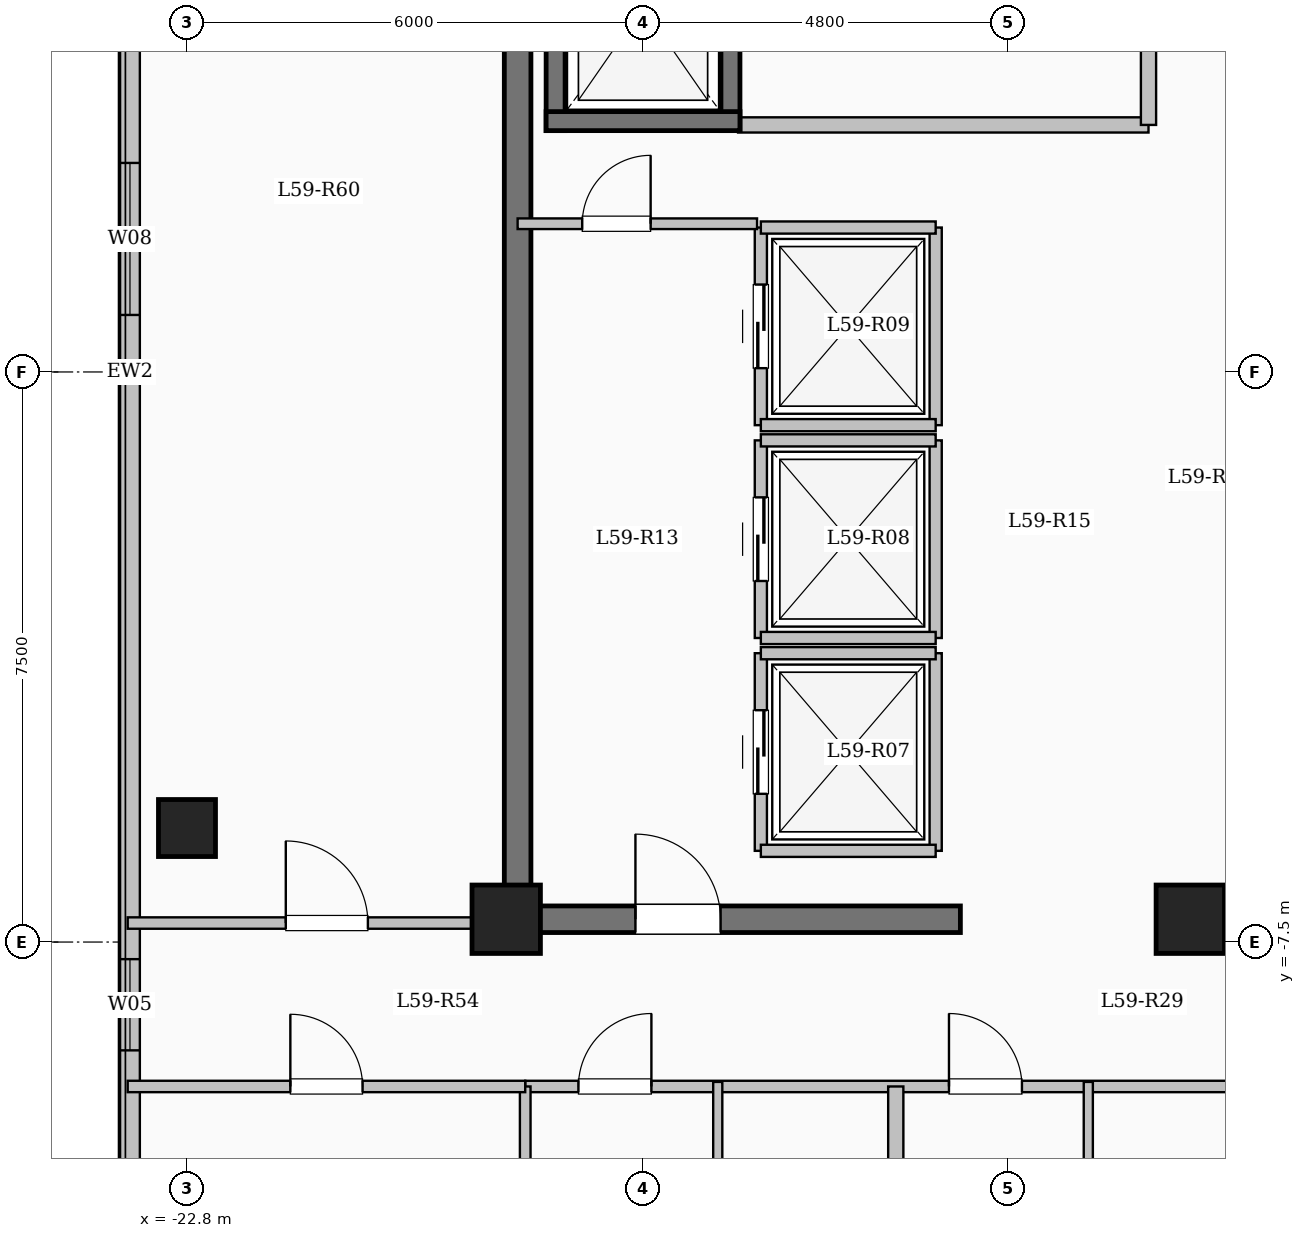
"""IFC4 building model, lengths in metres.
Left out: names, types, materials, properties, quantities, classifications, styles, units other than length and angle.
Written with IfcOpenShell. Run it as: python <this file> out.ifc"""

import sys

from ifc_helpers import new_model, si_unit, direction, frame, frame_2d, origin, origin_2d, place, context, subcontext, project, spatial, rectangle, extrude, element, fill, save


model = new_model("IFC4")
c1 = context("Model", 3, precision=1e-05, world=origin(), true_north=direction((0.0, 1.0)))
c2 = subcontext(c1, "Body", "Model", "MODEL_VIEW")
j1 = project(units=[si_unit("LENGTHUNIT", "METRE"), si_unit("PLANEANGLEUNIT", "RADIAN")], contexts=[c1])
p1 = place(None, origin())
s1 = spatial("IfcSite", under=j1, at=p1, CompositionType="ELEMENT")
p2 = place(p1, origin())
s2 = spatial("IfcBuilding", under=s1, at=p2, CompositionType="ELEMENT")
p3 = place(p2, frame((0.0, 0.0, 217.05)))
s3 = spatial("IfcBuildingStorey", under=s2, at=p3, CompositionType="ELEMENT", Elevation=217.05)
for number, where, z_axis, x_axis in (
    (1, (-9.6, -7.2, 0.0), (0.0, 0.0, 1.0), (1.0, 0.0, 0.0)),
    (2, (-18.6, -7.2, 0.0), (0.0, 0.0, 1.0), (1.0, 0.0, 0.0)),
):
    element("IfcColumn", number, at=place(p3, frame(where, z_axis=z_axis, x_axis=x_axis)), inside=s3, PredefinedType="COLUMN", context=c2, shape_type="SweptSolid", body=[
        extrude(rectangle(XDim=0.9, YDim=0.9, at=origin_2d()), origin(), (0.0, 0.0, 1.0), 3.35),
    ])
p4 = place(p3, frame((-22.8, -6.0, 0.0), z_axis=(0.0, 0.0, 1.0), x_axis=(1.0, 0.0, 0.0)))
e3 = element("IfcColumn", 3, at=p4, inside=s3, PredefinedType="COLUMN", context=c2, shape_type="SweptSolid", body=[
    extrude(rectangle(XDim=0.75, YDim=0.75, at=origin_2d()), origin(), (0.0, 0.0, 1.0), 3.35),
])
p5 = place(p3, frame((-23.55, -17.25, 0.0), z_axis=(0.0, 0.0, 1.0), x_axis=(0.0, 1.0, 0.0)))
e4 = element("IfcWall", 4, at=p5, inside=s3, PredefinedType="SOLIDWALL", context=c2, shape_type="SweptSolid", body=[
    extrude(rectangle(XDim=34.5, YDim=0.26, at=frame_2d((17.25, 0.0))), origin(), (0.0, 0.0, 1.0), 3.1),
])
p6 = place(p5, frame((2.825, 0.0, 0.9)))
e5 = element("IfcOpeningElement", 5, at=p6, cuts=e4, PredefinedType="OPENING", context=c2, shape_type="SweptSolid", body=[
    extrude(rectangle(XDim=2.2, YDim=1.75, at=frame_2d((1.1, 0.875))), frame((0.0, 0.14, 0.0), z_axis=(0.0, -1.0, 0.0), x_axis=(1.0, 0.0, 0.0)), (0.0, 0.0, 1.0), 0.28),
])
p7 = place(p5, frame((8.325, 0.0, 0.95)))
e6 = element("IfcOpeningElement", 6, at=p7, cuts=e4, PredefinedType="OPENING", context=c2, shape_type="SweptSolid", body=[
    extrude(rectangle(XDim=1.2, YDim=1.5, at=frame_2d((0.6, 0.75))), frame((0.0, 0.14, 0.0), z_axis=(0.0, -1.0, 0.0), x_axis=(1.0, 0.0, 0.0)), (0.0, 0.0, 1.0), 0.28),
])
p8 = place(p5, frame((18.0, 0.0, 0.9)))
e7 = element("IfcOpeningElement", 7, at=p8, cuts=e4, PredefinedType="OPENING", context=c2, shape_type="SweptSolid", body=[
    extrude(rectangle(XDim=2.0, YDim=1.7, at=frame_2d((1.0, 0.85))), frame((0.0, 0.14, 0.0), z_axis=(0.0, -1.0, 0.0), x_axis=(1.0, 0.0, 0.0)), (0.0, 0.0, 1.0), 0.28),
])
p9 = place(p5, frame((28.375, 0.0, 0.95)))
e8 = element("IfcOpeningElement", 8, at=p9, cuts=e4, PredefinedType="OPENING", context=c2, shape_type="SweptSolid", body=[
    extrude(rectangle(XDim=1.0, YDim=1.5, at=frame_2d((0.5, 0.75))), frame((0.0, 0.14, 0.0), z_axis=(0.0, -1.0, 0.0), x_axis=(1.0, 0.0, 0.0)), (0.0, 0.0, 1.0), 0.28),
])
p10 = place(p5, frame((31.125, 0.0, 0.9)))
e9 = element("IfcOpeningElement", 9, at=p10, cuts=e4, PredefinedType="OPENING", context=c2, shape_type="SweptSolid", body=[
    extrude(rectangle(XDim=2.0, YDim=1.7, at=frame_2d((1.0, 0.85))), frame((0.0, 0.14, 0.0), z_axis=(0.0, -1.0, 0.0), x_axis=(1.0, 0.0, 0.0)), (0.0, 0.0, 1.0), 0.28),
])
p11 = place(p3, frame((-15.55, 3.25, 0.0), z_axis=(0.0, 0.0, 1.0), x_axis=(1.0, 0.0, 0.0)))
e10 = element("IfcWall", 10, at=p11, inside=s3, PredefinedType="SOLIDWALL", context=c2, shape_type="SweptSolid", body=[
    extrude(rectangle(XDim=5.4, YDim=0.2, at=frame_2d((2.7, 0.0))), origin(), (0.0, 0.0, 1.0), 3.1),
])
p12 = place(p3, frame((-10.15, 3.25, 0.0), z_axis=(0.0, 0.0, 1.0), x_axis=(0.0, 1.0, 0.0)))
e11 = element("IfcWall", 11, at=p12, inside=s3, PredefinedType="SOLIDWALL", context=c2, shape_type="SweptSolid", body=[
    extrude(rectangle(XDim=3.25, YDim=0.2, at=frame_2d((1.625, 0.0))), origin(), (0.0, 0.0, 1.0), 3.1),
])
p13 = place(p12, frame((1.1, 0.0, 0.0)))
e12 = element("IfcOpeningElement", 12, at=p13, cuts=e11, PredefinedType="OPENING", context=c2, shape_type="SweptSolid", body=[
    extrude(rectangle(XDim=1.02, YDim=2.15, at=frame_2d((0.51, 1.075))), frame((0.0, 0.11, 0.0), z_axis=(0.0, -1.0, 0.0), x_axis=(1.0, 0.0, 0.0)), (0.0, 0.0, 1.0), 0.22),
])
p14 = place(p3, frame((-17.95, 3.175, 0.0), z_axis=(0.0, 0.0, 1.0), x_axis=(0.0, 1.0, 0.0)))
e13 = element("IfcWall", 13, at=p14, inside=s3, PredefinedType="SHEAR", context=c2, shape_type="SweptSolid", body=[
    extrude(rectangle(XDim=3.25, YDim=0.25, at=frame_2d((1.625, 0.0))), origin(), (0.0, 0.0, 1.0), 3.35),
])
p15 = place(p3, frame((-15.65, 3.175, 0.0), z_axis=(0.0, 0.0, 1.0), x_axis=(0.0, 1.0, 0.0)))
e14 = element("IfcWall", 14, at=p15, inside=s3, PredefinedType="SHEAR", context=c2, shape_type="SweptSolid", body=[
    extrude(rectangle(XDim=3.25, YDim=0.25, at=frame_2d((1.625, 0.0))), origin(), (0.0, 0.0, 1.0), 3.35),
])
p16 = place(p15, frame((1.075, 0.0, 0.0)))
e15 = element("IfcOpeningElement", 15, at=p16, cuts=e14, PredefinedType="OPENING", context=c2, shape_type="SweptSolid", body=[
    extrude(rectangle(XDim=1.1, YDim=2.15, at=frame_2d((0.55, 1.075))), frame((0.0, 0.135, 0.0), z_axis=(0.0, -1.0, 0.0), x_axis=(1.0, 0.0, 0.0)), (0.0, 0.0, 1.0), 0.27),
])
p17 = place(p3, frame((-18.075, 3.3, 0.0), z_axis=(0.0, 0.0, 1.0), x_axis=(1.0, 0.0, 0.0)))
e16 = element("IfcWall", 16, at=p17, inside=s3, PredefinedType="SHEAR", context=c2, shape_type="SweptSolid", body=[
    extrude(rectangle(XDim=2.55, YDim=0.25, at=frame_2d((1.275, 0.0))), origin(), (0.0, 0.0, 1.0), 3.35),
])
p18 = place(p3, frame((-15.25, -6.3, 0.0), z_axis=(0.0, 0.0, 1.0), x_axis=(0.0, 1.0, 0.0)))
e17 = element("IfcWall", 17, at=p18, inside=s3, PredefinedType="SOLIDWALL", context=c2, shape_type="SweptSolid", body=[
    extrude(rectangle(XDim=2.6, YDim=0.16, at=frame_2d((1.3, 0.0))), origin(), (0.0, 0.0, 1.0), 3.1),
])
p19 = place(p18, frame((0.75, 0.0, 0.0)))
e18 = element("IfcOpeningElement", 18, at=p19, cuts=e17, PredefinedType="OPENING", context=c2, shape_type="SweptSolid", body=[
    extrude(rectangle(XDim=1.1, YDim=2.15, at=frame_2d((0.55, 1.075))), frame((0.0, 0.09, 0.0), z_axis=(0.0, -1.0, 0.0), x_axis=(1.0, 0.0, 0.0)), (0.0, 0.0, 1.0), 0.18),
])
p20 = place(p3, frame((-12.95, -6.3, 0.0), z_axis=(0.0, 0.0, 1.0), x_axis=(0.0, 1.0, 0.0)))
e19 = element("IfcWall", 19, at=p20, inside=s3, PredefinedType="SOLIDWALL", context=c2, shape_type="SweptSolid", body=[
    extrude(rectangle(XDim=2.6, YDim=0.16, at=frame_2d((1.3, 0.0))), origin(), (0.0, 0.0, 1.0), 3.1),
])
for number, where, z_axis, x_axis in (
    (20, (-15.25, -6.3, 0.0), (0.0, 0.0, 1.0), (1.0, 0.0, 0.0)),
    (21, (-15.25, -3.7, 0.0), (0.0, 0.0, 1.0), (1.0, 0.0, 0.0)),
):
    element("IfcWall", number, at=place(p3, frame(where, z_axis=z_axis, x_axis=x_axis)), inside=s3, PredefinedType="SOLIDWALL", context=c2, shape_type="SweptSolid", body=[
        extrude(rectangle(XDim=2.3, YDim=0.16, at=frame_2d((1.15, 0.0))), origin(), (0.0, 0.0, 1.0), 3.1),
    ])
p21 = place(p3, frame((-15.25, -3.5, 0.0), z_axis=(0.0, 0.0, 1.0), x_axis=(0.0, 1.0, 0.0)))
e22 = element("IfcWall", 22, at=p21, inside=s3, PredefinedType="SOLIDWALL", context=c2, shape_type="SweptSolid", body=[
    extrude(rectangle(XDim=2.6, YDim=0.16, at=frame_2d((1.3, 0.0))), origin(), (0.0, 0.0, 1.0), 3.1),
])
p22 = place(p21, frame((0.75, 0.0, 0.0)))
e23 = element("IfcOpeningElement", 23, at=p22, cuts=e22, PredefinedType="OPENING", context=c2, shape_type="SweptSolid", body=[
    extrude(rectangle(XDim=1.1, YDim=2.15, at=frame_2d((0.55, 1.075))), frame((0.0, 0.09, 0.0), z_axis=(0.0, -1.0, 0.0), x_axis=(1.0, 0.0, 0.0)), (0.0, 0.0, 1.0), 0.18),
])
p23 = place(p3, frame((-12.95, -3.5, 0.0), z_axis=(0.0, 0.0, 1.0), x_axis=(0.0, 1.0, 0.0)))
e24 = element("IfcWall", 24, at=p23, inside=s3, PredefinedType="SOLIDWALL", context=c2, shape_type="SweptSolid", body=[
    extrude(rectangle(XDim=2.6, YDim=0.16, at=frame_2d((1.3, 0.0))), origin(), (0.0, 0.0, 1.0), 3.1),
])
for number, where, z_axis, x_axis in (
    (25, (-15.25, -3.5, 0.0), (0.0, 0.0, 1.0), (1.0, 0.0, 0.0)),
    (26, (-15.25, -0.9, 0.0), (0.0, 0.0, 1.0), (1.0, 0.0, 0.0)),
):
    element("IfcWall", number, at=place(p3, frame(where, z_axis=z_axis, x_axis=x_axis)), inside=s3, PredefinedType="SOLIDWALL", context=c2, shape_type="SweptSolid", body=[
        extrude(rectangle(XDim=2.3, YDim=0.16, at=frame_2d((1.15, 0.0))), origin(), (0.0, 0.0, 1.0), 3.1),
    ])
p24 = place(p3, frame((-15.25, -0.7, 0.0), z_axis=(0.0, 0.0, 1.0), x_axis=(0.0, 1.0, 0.0)))
e27 = element("IfcWall", 27, at=p24, inside=s3, PredefinedType="SOLIDWALL", context=c2, shape_type="SweptSolid", body=[
    extrude(rectangle(XDim=2.6, YDim=0.16, at=frame_2d((1.3, 0.0))), origin(), (0.0, 0.0, 1.0), 3.1),
])
p25 = place(p24, frame((0.75, 0.0, 0.0)))
e28 = element("IfcOpeningElement", 28, at=p25, cuts=e27, PredefinedType="OPENING", context=c2, shape_type="SweptSolid", body=[
    extrude(rectangle(XDim=1.1, YDim=2.15, at=frame_2d((0.55, 1.075))), frame((0.0, 0.09, 0.0), z_axis=(0.0, -1.0, 0.0), x_axis=(1.0, 0.0, 0.0)), (0.0, 0.0, 1.0), 0.18),
])
p26 = place(p3, frame((-12.95, -0.7, 0.0), z_axis=(0.0, 0.0, 1.0), x_axis=(0.0, 1.0, 0.0)))
e29 = element("IfcWall", 29, at=p26, inside=s3, PredefinedType="SOLIDWALL", context=c2, shape_type="SweptSolid", body=[
    extrude(rectangle(XDim=2.6, YDim=0.16, at=frame_2d((1.3, 0.0))), origin(), (0.0, 0.0, 1.0), 3.1),
])
for number, where, z_axis, x_axis in (
    (30, (-15.25, -0.7, 0.0), (0.0, 0.0, 1.0), (1.0, 0.0, 0.0)),
    (31, (-15.25, 1.9, 0.0), (0.0, 0.0, 1.0), (1.0, 0.0, 0.0)),
):
    element("IfcWall", number, at=place(p3, frame(where, z_axis=z_axis, x_axis=x_axis)), inside=s3, PredefinedType="SOLIDWALL", context=c2, shape_type="SweptSolid", body=[
        extrude(rectangle(XDim=2.3, YDim=0.16, at=frame_2d((1.15, 0.0))), origin(), (0.0, 0.0, 1.0), 3.1),
    ])
p27 = place(p3, frame((-18.45, -7.375, 0.0), z_axis=(0.0, 0.0, 1.0), x_axis=(0.0, 1.0, 0.0)))
e32 = element("IfcWall", 32, at=p27, inside=s3, PredefinedType="SHEAR", context=c2, shape_type="SweptSolid", body=[
    extrude(rectangle(XDim=14.05, YDim=0.35, at=frame_2d((7.025, 0.0))), origin(), (0.0, 0.0, 1.0), 3.35),
])
p28 = place(p3, frame((-18.625, -7.2, 0.0), z_axis=(0.0, 0.0, 1.0), x_axis=(1.0, 0.0, 0.0)))
e33 = element("IfcWall", 33, at=p28, inside=s3, PredefinedType="SHEAR", context=c2, shape_type="SweptSolid", body=[
    extrude(rectangle(XDim=6.0, YDim=0.35, at=frame_2d((3.0, 0.0))), origin(), (0.0, 0.0, 1.0), 3.35),
])
p29 = place(p28, frame((1.725, 0.0, 0.0)))
e34 = element("IfcOpeningElement", 34, at=p29, cuts=e33, PredefinedType="OPENING", context=c2, shape_type="SweptSolid", body=[
    extrude(rectangle(XDim=1.12, YDim=2.15, at=frame_2d((0.56, 1.075))), frame((0.0, 0.185, 0.0), z_axis=(0.0, -1.0, 0.0), x_axis=(1.0, 0.0, 0.0)), (0.0, 0.0, 1.0), 0.37),
])
p30 = place(p3, frame((-18.45, 1.95, 0.0), z_axis=(0.0, 0.0, 1.0), x_axis=(1.0, 0.0, 0.0)))
e35 = element("IfcWall", 35, at=p30, inside=s3, PredefinedType="PARTITIONING", context=c2, shape_type="SweptSolid", body=[
    extrude(rectangle(XDim=3.15, YDim=0.14, at=frame_2d((1.575, 0.0))), origin(), (0.0, 0.0, 1.0), 3.1),
])
p31 = place(p30, frame((0.85, 0.0, 0.0)))
e36 = element("IfcOpeningElement", 36, at=p31, cuts=e35, PredefinedType="OPENING", context=c2, shape_type="SweptSolid", body=[
    extrude(rectangle(XDim=0.9, YDim=2.08, at=frame_2d((0.45, 1.04))), frame((0.0, 0.08, 0.0), z_axis=(0.0, -1.0, 0.0), x_axis=(1.0, 0.0, 0.0)), (0.0, 0.0, 1.0), 0.16),
])
p32 = place(p3, frame((-18.35, -9.4, 0.0), z_axis=(0.0, 0.0, 1.0), x_axis=(1.0, 0.0, 0.0)))
e37 = element("IfcWall", 37, at=p32, inside=s3, PredefinedType="PARTITIONING", context=c2, shape_type="SweptSolid", body=[
    extrude(rectangle(XDim=9.8, YDim=0.15, at=frame_2d((4.9, 0.0))), origin(), (0.0, 0.0, 1.0), 3.1),
])
p33 = place(p32, frame((0.7, 0.0, 0.0)))
e38 = element("IfcOpeningElement", 38, at=p33, cuts=e37, PredefinedType="OPENING", context=c2, shape_type="SweptSolid", body=[
    extrude(rectangle(XDim=0.96, YDim=2.15, at=frame_2d((0.48, 1.075))), frame((0.0, 0.085, 0.0), z_axis=(0.0, -1.0, 0.0), x_axis=(1.0, 0.0, 0.0)), (0.0, 0.0, 1.0), 0.17),
])
p34 = place(p32, frame((5.575, 0.0, 0.0)))
e39 = element("IfcOpeningElement", 39, at=p34, cuts=e37, PredefinedType="OPENING", context=c2, shape_type="SweptSolid", body=[
    extrude(rectangle(XDim=0.96, YDim=2.15, at=frame_2d((0.48, 1.075))), frame((0.0, 0.085, 0.0), z_axis=(0.0, -1.0, 0.0), x_axis=(1.0, 0.0, 0.0)), (0.0, 0.0, 1.0), 0.17),
])
p35 = place(p3, frame((-13.475, -20.9, 0.0), z_axis=(0.0, 0.0, 1.0), x_axis=(0.0, 1.0, 0.0)))
e40 = element("IfcWall", 40, at=p35, inside=s3, PredefinedType="SOLIDWALL", context=c2, shape_type="SweptSolid", body=[
    extrude(rectangle(XDim=11.5, YDim=0.2, at=frame_2d((5.75, 0.0))), origin(), (0.0, 0.0, 1.0), 3.1),
])
p36 = place(p3, frame((-15.817, -12.56, 0.0), z_axis=(0.0, 0.0, 1.0), x_axis=(0.0, 1.0, 0.0)))
e41 = element("IfcWall", 41, at=p36, inside=s3, PredefinedType="PARTITIONING", context=c2, shape_type="SweptSolid", body=[
    extrude(rectangle(XDim=3.22, YDim=0.12, at=frame_2d((1.61, 0.0))), origin(), (0.0, 0.0, 1.0), 3.1),
])
p37 = place(p36, frame((1.14, 0.0, 0.0)))
e42 = element("IfcOpeningElement", 42, at=p37, cuts=e41, PredefinedType="OPENING", context=c2, shape_type="SweptSolid", body=[
    extrude(rectangle(XDim=0.88, YDim=2.1, at=frame_2d((0.44, 1.05))), frame((0.0, 0.07, 0.0), z_axis=(0.0, -1.0, 0.0), x_axis=(1.0, 0.0, 0.0)), (0.0, 0.0, 1.0), 0.14),
])
p38 = place(p3, frame((-10.942, -12.56, 0.0), z_axis=(0.0, 0.0, 1.0), x_axis=(0.0, 1.0, 0.0)))
e43 = element("IfcWall", 43, at=p38, inside=s3, PredefinedType="PARTITIONING", context=c2, shape_type="SweptSolid", body=[
    extrude(rectangle(XDim=3.22, YDim=0.12, at=frame_2d((1.61, 0.0))), origin(), (0.0, 0.0, 1.0), 3.1),
])
p39 = place(p38, frame((1.14, 0.0, 0.0)))
e44 = element("IfcOpeningElement", 44, at=p39, cuts=e43, PredefinedType="OPENING", context=c2, shape_type="SweptSolid", body=[
    extrude(rectangle(XDim=0.88, YDim=2.1, at=frame_2d((0.44, 1.05))), frame((0.0, 0.07, 0.0), z_axis=(0.0, -1.0, 0.0), x_axis=(1.0, 0.0, 0.0)), (0.0, 0.0, 1.0), 0.14),
])
p40 = place(p3, frame((-23.58, -7.25, 0.0), z_axis=(0.0, 0.0, 1.0), x_axis=(1.0, 0.0, 0.0)))
e45 = element("IfcWall", 45, at=p40, inside=s3, PredefinedType="PARTITIONING", context=c2, shape_type="SweptSolid", body=[
    extrude(rectangle(XDim=5.13, YDim=0.15, at=frame_2d((2.565, 0.0))), origin(), (0.0, 0.0, 1.0), 3.1),
])
p41 = place(p40, frame((2.08, 0.0, 0.0)))
e46 = element("IfcOpeningElement", 46, at=p41, cuts=e45, PredefinedType="OPENING", context=c2, shape_type="SweptSolid", body=[
    extrude(rectangle(XDim=1.08, YDim=2.15, at=frame_2d((0.54, 1.075))), frame((0.0, 0.085, 0.0), z_axis=(0.0, -1.0, 0.0), x_axis=(1.0, 0.0, 0.0)), (0.0, 0.0, 1.0), 0.17),
])
p42 = place(p3, frame((-18.35, -17.25, 0.0), z_axis=(0.0, 0.0, 1.0), x_axis=(0.0, 1.0, 0.0)))
e47 = element("IfcWall", 47, at=p42, inside=s3, PredefinedType="PARTITIONING", context=c2, shape_type="SweptSolid", body=[
    extrude(rectangle(XDim=7.85, YDim=0.14, at=frame_2d((3.925, 0.0))), origin(), (0.0, 0.0, 1.0), 3.1),
])
p43 = place(p3, frame((-23.58, -9.4, 0.0), z_axis=(0.0, 0.0, 1.0), x_axis=(1.0, 0.0, 0.0)))
e48 = element("IfcWall", 48, at=p43, inside=s3, PredefinedType="PARTITIONING", context=c2, shape_type="SweptSolid", body=[
    extrude(rectangle(XDim=5.23, YDim=0.15, at=frame_2d((2.615, 0.0))), origin(), (0.0, 0.0, 1.0), 3.1),
])
p44 = place(p43, frame((2.14, 0.0, 0.0)))
e49 = element("IfcOpeningElement", 49, at=p44, cuts=e48, PredefinedType="OPENING", context=c2, shape_type="SweptSolid", body=[
    extrude(rectangle(XDim=0.95, YDim=2.15, at=frame_2d((0.475, 1.075))), frame((0.0, 0.085, 0.0), z_axis=(0.0, -1.0, 0.0), x_axis=(1.0, 0.0, 0.0)), (0.0, 0.0, 1.0), 0.17),
])
p45 = place(p7, origin())
e50 = element("IfcWindow", 50, at=p45, inside=s3, PartitioningType="SINGLE_PANEL", PredefinedType="WINDOW", context=c2, shape_type="SweptSolid", body=[
    extrude(rectangle(XDim=1.2, YDim=1.5, at=frame_2d((0.6, 0.75))), frame((0.0, 0.03, 0.0), z_axis=(0.0, -1.0, 0.0), x_axis=(1.0, 0.0, 0.0)), (0.0, 0.0, 1.0), 0.06),
])
fill(e6, e50)
p46 = place(p8, origin())
e51 = element("IfcWindow", 51, at=p46, inside=s3, PartitioningType="SINGLE_PANEL", PredefinedType="WINDOW", context=c2, shape_type="SweptSolid", body=[
    extrude(rectangle(XDim=2.0, YDim=1.7, at=frame_2d((1.0, 0.85))), frame((0.0, 0.03, 0.0), z_axis=(0.0, -1.0, 0.0), x_axis=(1.0, 0.0, 0.0)), (0.0, 0.0, 1.0), 0.06),
])
fill(e7, e51)
p47 = place(p19, origin())
e52 = element("IfcDoor", 52, at=p47, inside=s3, OperationType="SLIDING_TO_LEFT", PredefinedType="DOOR", context=c2, shape_type="SweptSolid", body=[
    extrude(rectangle(XDim=1.1, YDim=2.15, at=frame_2d((0.55, 1.075))), frame((0.0, 0.025, 0.0), z_axis=(0.0, -1.0, 0.0), x_axis=(1.0, 0.0, 0.0)), (0.0, 0.0, 1.0), 0.05),
])
fill(e18, e52)
p48 = place(p22, origin())
e53 = element("IfcDoor", 53, at=p48, inside=s3, OperationType="SLIDING_TO_LEFT", PredefinedType="DOOR", context=c2, shape_type="SweptSolid", body=[
    extrude(rectangle(XDim=1.1, YDim=2.15, at=frame_2d((0.55, 1.075))), frame((0.0, 0.025, 0.0), z_axis=(0.0, -1.0, 0.0), x_axis=(1.0, 0.0, 0.0)), (0.0, 0.0, 1.0), 0.05),
])
fill(e23, e53)
p49 = place(p25, origin())
e54 = element("IfcDoor", 54, at=p49, inside=s3, OperationType="SLIDING_TO_LEFT", PredefinedType="DOOR", context=c2, shape_type="SweptSolid", body=[
    extrude(rectangle(XDim=1.1, YDim=2.15, at=frame_2d((0.55, 1.075))), frame((0.0, 0.025, 0.0), z_axis=(0.0, -1.0, 0.0), x_axis=(1.0, 0.0, 0.0)), (0.0, 0.0, 1.0), 0.05),
])
fill(e28, e54)
p50 = place(p29, origin())
e55 = element("IfcDoor", 55, at=p50, inside=s3, OperationType="SINGLE_SWING_LEFT", PredefinedType="DOOR", context=c2, shape_type="SweptSolid", body=[
    extrude(rectangle(XDim=1.12, YDim=2.15, at=frame_2d((0.56, 1.075))), frame((0.0, 0.025, 0.0), z_axis=(0.0, -1.0, 0.0), x_axis=(1.0, 0.0, 0.0)), (0.0, 0.0, 1.0), 0.05),
])
fill(e34, e55)
p51 = place(p31, origin())
e56 = element("IfcDoor", 56, at=p51, inside=s3, OperationType="SINGLE_SWING_RIGHT", PredefinedType="DOOR", context=c2, shape_type="SweptSolid", body=[
    extrude(rectangle(XDim=0.9, YDim=2.08, at=frame_2d((0.45, 1.04))), frame((0.0, 0.025, 0.0), z_axis=(0.0, -1.0, 0.0), x_axis=(1.0, 0.0, 0.0)), (0.0, 0.0, 1.0), 0.05),
])
fill(e36, e56)
p52 = place(p33, origin())
e57 = element("IfcDoor", 57, at=p52, inside=s3, OperationType="SINGLE_SWING_RIGHT", PredefinedType="DOOR", context=c2, shape_type="SweptSolid", body=[
    extrude(rectangle(XDim=0.96, YDim=2.15, at=frame_2d((0.48, 1.075))), frame((0.0, 0.025, 0.0), z_axis=(0.0, -1.0, 0.0), x_axis=(1.0, 0.0, 0.0)), (0.0, 0.0, 1.0), 0.05),
])
fill(e38, e57)
p53 = place(p34, origin())
e58 = element("IfcDoor", 58, at=p53, inside=s3, OperationType="SINGLE_SWING_LEFT", PredefinedType="DOOR", context=c2, shape_type="SweptSolid", body=[
    extrude(rectangle(XDim=0.96, YDim=2.15, at=frame_2d((0.48, 1.075))), frame((0.0, 0.025, 0.0), z_axis=(0.0, -1.0, 0.0), x_axis=(1.0, 0.0, 0.0)), (0.0, 0.0, 1.0), 0.05),
])
fill(e39, e58)
p54 = place(p44, origin())
e59 = element("IfcDoor", 59, at=p54, inside=s3, OperationType="SINGLE_SWING_LEFT", PredefinedType="DOOR", context=c2, shape_type="SweptSolid", body=[
    extrude(rectangle(XDim=0.95, YDim=2.15, at=frame_2d((0.475, 1.075))), frame((0.0, 0.025, 0.0), z_axis=(0.0, -1.0, 0.0), x_axis=(1.0, 0.0, 0.0)), (0.0, 0.0, 1.0), 0.05),
])
fill(e49, e59)
p55 = place(p41, origin())
e60 = element("IfcDoor", 60, at=p55, inside=s3, OperationType="SINGLE_SWING_LEFT", PredefinedType="DOOR", context=c2, shape_type="SweptSolid", body=[
    extrude(rectangle(XDim=1.08, YDim=2.15, at=frame_2d((0.54, 1.075))), frame((0.0, 0.025, 0.0), z_axis=(0.0, -1.0, 0.0), x_axis=(1.0, 0.0, 0.0)), (0.0, 0.0, 1.0), 0.05),
])
fill(e46, e60)
save(model, sys.argv[1])
